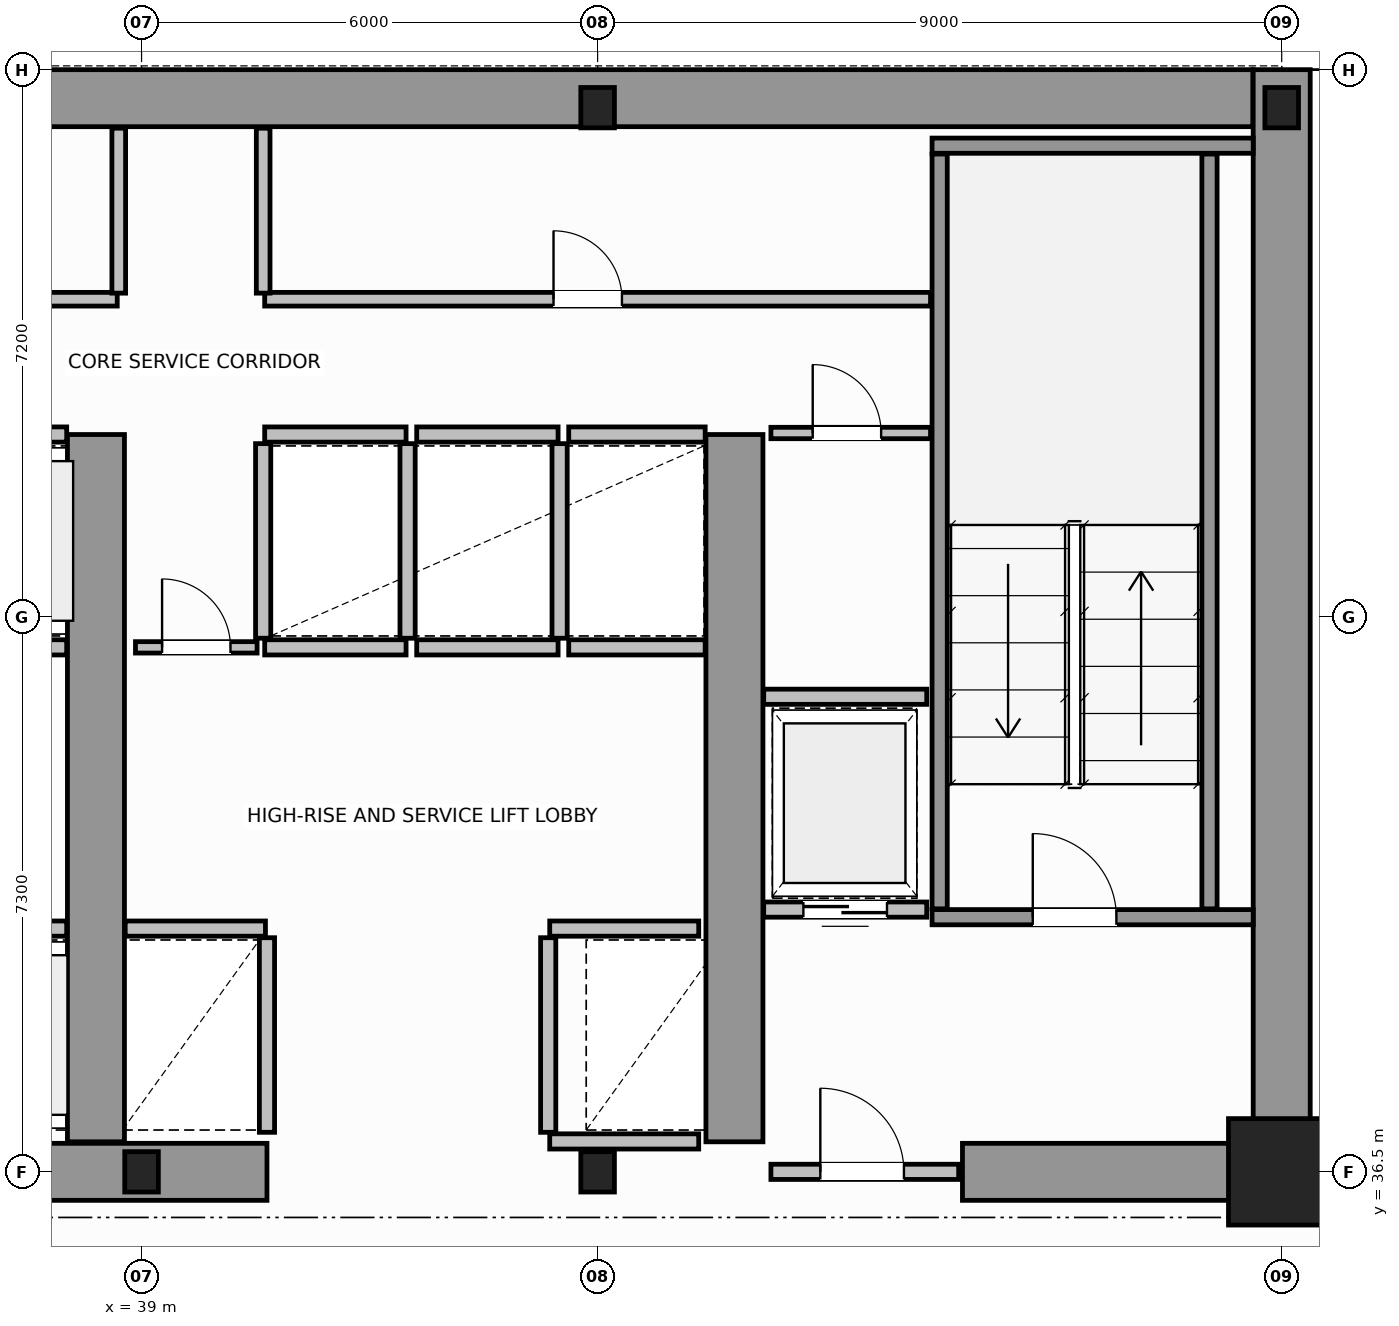
"""IFC4 building model, lengths in metres.
Left out: names, types, materials, properties, quantities, classifications, styles, units other than length and angle.
Written with IfcOpenShell. Run it as: python <this file> out.ifc"""

import sys

from ifc_helpers import new_model, si_unit, direction, frame, frame_2d, origin, origin_2d, place, context, subcontext, project, spatial, rectangle, i_section, extrude, source, transform, mapped, element, fill, save


model = new_model("IFC4")
c1 = context("Model", 3, precision=1e-05, world=origin(), true_north=direction((0.0, 1.0)))
c2 = subcontext(c1, "Body", "Model", "MODEL_VIEW")
j1 = project(units=[si_unit("LENGTHUNIT", "METRE"), si_unit("PLANEANGLEUNIT", "RADIAN")], contexts=[c1])
p1 = place(None, origin())
s1 = spatial("IfcSite", under=j1, at=p1, CompositionType="ELEMENT")
p2 = place(p1, origin())
s2 = spatial("IfcBuilding", under=s1, at=p2, CompositionType="ELEMENT")
p3 = place(p2, frame((0.0, 0.0, 103.4)))
s3 = spatial("IfcBuildingStorey", under=s2, at=p3, CompositionType="ELEMENT", Elevation=103.4)
m1 = source(origin(), c2, "Body", "SweptSolid", [
    extrude(i_section(OverallWidth=0.442, OverallDepth=0.531, WebThickness=0.065, FlangeThickness=0.076, FilletRadius=0.015, at=origin_2d()), origin(), (0.0, 0.0, 1.0), 3.8),
])
for number, where, z_axis, x_axis in (
    (1, (39.0, 36.5, 0.0), (0.0, 0.0, 1.0), (1.0, 0.0, 0.0)),
    (2, (45.0, 36.5, 0.0), (0.0, 0.0, 1.0), (1.0, 0.0, 0.0)),
):
    element("IfcColumn", number, at=place(p3, frame(where, z_axis=z_axis, x_axis=x_axis)), inside=s3, PredefinedType="COLUMN", context=c2, shape_type="MappedRepresentation", body=[
        mapped(m1, transform((0.0, 0.0, 0.0), scale=1.0)),
    ])
m2 = source(origin(), c2, "Body", "SweptSolid", [
    extrude(rectangle(XDim=1.4, YDim=1.4, at=origin_2d()), origin(), (0.0, 0.0, 1.0), 3.8),
])
p4 = place(p3, frame((54.0, 36.5, 0.0), z_axis=(0.0, 0.0, 1.0), x_axis=(1.0, 0.0, 0.0)))
e3 = element("IfcColumn", 3, at=p4, inside=s3, PredefinedType="COLUMN", context=c2, shape_type="MappedRepresentation", body=[
    mapped(m2, transform((0.0, 0.0, 0.0), scale=1.0)),
])
for number, where, z_axis, x_axis in (
    (4, (45.0, 50.5, 0.0), (0.0, 0.0, 1.0), (1.0, 0.0, 0.0)),
    (5, (54.0, 50.5, 0.0), (0.0, 0.0, 1.0), (1.0, 0.0, 0.0)),
):
    element("IfcColumn", number, at=place(p3, frame(where, z_axis=z_axis, x_axis=x_axis)), inside=s3, PredefinedType="COLUMN", context=c2, shape_type="MappedRepresentation", body=[
        mapped(m1, transform((0.0, 0.0, 0.0), scale=1.0)),
    ])
p5 = place(p3, frame((34.002, 50.625, 0.0), z_axis=(0.0, 0.0, 1.0), x_axis=(1.0, 0.0, 0.0)))
e6 = element("IfcWall", 6, at=p5, inside=s3, PredefinedType="SHEAR", context=c2, shape_type="SweptSolid", body=[
    extrude(rectangle(XDim=19.619, YDim=0.75, at=frame_2d((9.81, 0.0))), origin(), (0.0, 0.0, 1.0), 3.8),
])
p6 = place(p3, frame((54.0, 36.5, 0.0), z_axis=(0.0, 0.0, 1.0), x_axis=(0.0, 1.0, 0.0)))
e7 = element("IfcWall", 7, at=p6, inside=s3, PredefinedType="SHEAR", context=c2, shape_type="SweptSolid", body=[
    extrude(rectangle(XDim=14.5, YDim=0.75, at=frame_2d((7.25, 0.0))), origin(), (0.0, 0.0, 1.0), 3.8),
])
p7 = place(p3, frame((36.15, 36.5, 0.0), z_axis=(0.0, 0.0, 1.0), x_axis=(1.0, 0.0, 0.0)))
e8 = element("IfcWall", 8, at=p7, inside=s3, PredefinedType="SHEAR", context=c2, shape_type="SweptSolid", body=[
    extrude(rectangle(XDim=4.5, YDim=0.75, at=frame_2d((2.25, 0.0))), origin(), (0.0, 0.0, 1.0), 3.8),
])
p8 = place(p3, frame((49.8, 36.5, 0.0), z_axis=(0.0, 0.0, 1.0), x_axis=(1.0, 0.0, 0.0)))
e9 = element("IfcWall", 9, at=p8, inside=s3, PredefinedType="SHEAR", context=c2, shape_type="SweptSolid", body=[
    extrude(rectangle(XDim=3.805, YDim=0.75, at=frame_2d((1.902, 0.0))), origin(), (0.0, 0.0, 1.0), 2.38),
])
for number, where, z_axis, x_axis in (
    (10, (38.4, 36.895, 0.0), (0.0, 0.0, 1.0), (0.0, 1.0, 0.0)),
    (11, (46.8, 36.895, 0.0), (0.0, 0.0, 1.0), (0.0, 1.0, 0.0)),
):
    element("IfcWall", number, at=place(p3, frame(where, z_axis=z_axis, x_axis=x_axis)), inside=s3, PredefinedType="SHEAR", context=c2, shape_type="SweptSolid", body=[
        extrude(rectangle(XDim=9.305, YDim=0.75, at=frame_2d((4.652, 0.0))), origin(), (0.0, 0.0, 1.0), 3.8),
    ])
p9 = place(p3, frame((49.4, 39.85, 0.0), z_axis=(0.0, 0.0, 1.0), x_axis=(1.0, 0.0, 0.0)))
e12 = element("IfcWall", 12, at=p9, inside=s3, PredefinedType="SOLIDWALL", context=c2, shape_type="SweptSolid", body=[
    extrude(rectangle(XDim=4.225, YDim=0.2, at=frame_2d((2.113, 0.0))), origin(), (0.0, 0.0, 1.0), 3.8),
])
p10 = place(p9, frame((1.325, 0.0, 0.0)))
e13 = element("IfcOpeningElement", 13, at=p10, cuts=e12, PredefinedType="OPENING", context=c2, shape_type="SweptSolid", body=[
    extrude(rectangle(XDim=1.1, YDim=2.15, at=frame_2d((0.55, 1.075))), frame((0.0, 0.11, 0.0), z_axis=(0.0, -1.0, 0.0), x_axis=(1.0, 0.0, 0.0)), (0.0, 0.0, 1.0), 0.22),
])
p11 = place(p3, frame((49.4, 50.0, 0.0), z_axis=(0.0, 0.0, 1.0), x_axis=(1.0, 0.0, 0.0)))
e14 = element("IfcWall", 14, at=p11, inside=s3, PredefinedType="SOLIDWALL", context=c2, shape_type="SweptSolid", body=[
    extrude(rectangle(XDim=4.225, YDim=0.2, at=frame_2d((2.113, 0.0))), origin(), (0.0, 0.0, 1.0), 3.8),
])
for number, where, z_axis, x_axis in (
    (15, (49.5, 39.96, 0.0), (0.0, 0.0, 1.0), (0.0, 1.0, 0.0)),
    (16, (53.05, 39.96, 0.0), (0.0, 0.0, 1.0), (0.0, 1.0, 0.0)),
):
    element("IfcWall", number, at=place(p3, frame(where, z_axis=z_axis, x_axis=x_axis)), inside=s3, PredefinedType="SOLIDWALL", context=c2, shape_type="SweptSolid", body=[
        extrude(rectangle(XDim=9.93, YDim=0.2, at=frame_2d((4.965, 0.0))), origin(), (0.0, 0.0, 1.0), 3.8),
    ])
p12 = place(p3, frame((47.28, 36.5, 0.0), z_axis=(0.0, 0.0, 1.0), x_axis=(1.0, 0.0, 0.0)))
e17 = element("IfcWall", 17, at=p12, inside=s3, PredefinedType="SOLIDWALL", context=c2, shape_type="SweptSolid", body=[
    extrude(rectangle(XDim=2.47, YDim=0.2, at=frame_2d((1.235, 0.0))), origin(), (0.0, 0.0, 1.0), 2.37),
])
p13 = place(p12, frame((0.65, 0.0, 0.0)))
e18 = element("IfcOpeningElement", 18, at=p13, cuts=e17, PredefinedType="OPENING", context=c2, shape_type="SweptSolid", body=[
    extrude(rectangle(XDim=1.1, YDim=2.15, at=frame_2d((0.55, 1.075))), frame((0.0, 0.11, 0.0), z_axis=(0.0, -1.0, 0.0), x_axis=(1.0, 0.0, 0.0)), (0.0, 0.0, 1.0), 0.22),
])
p14 = place(p3, frame((36.17, 39.7, 0.0), z_axis=(0.0, 0.0, 1.0), x_axis=(1.0, 0.0, 0.0)))
e19 = element("IfcWall", 19, at=p14, inside=s3, PredefinedType="SOLIDWALL", context=c2, shape_type="SweptSolid", body=[
    extrude(rectangle(XDim=1.845, YDim=0.2, at=frame_2d((0.922, 0.0))), origin(), (0.0, 0.0, 1.0), 3.58),
])
p15 = place(p14, frame((0.372, 0.0, 0.0)))
e20 = element("IfcOpeningElement", 20, at=p15, cuts=e19, PredefinedType="OPENING", context=c2, shape_type="SweptSolid", body=[
    extrude(rectangle(XDim=1.1, YDim=2.15, at=frame_2d((0.55, 1.075))), frame((0.0, 0.11, 0.0), z_axis=(0.0, -1.0, 0.0), x_axis=(1.0, 0.0, 0.0)), (0.0, 0.0, 1.0), 0.22),
])
p16 = place(p3, frame((36.29, 43.4, 0.0), z_axis=(0.0, 0.0, 1.0), x_axis=(1.0, 0.0, 0.0)))
e21 = element("IfcWall", 21, at=p16, inside=s3, PredefinedType="SOLIDWALL", context=c2, shape_type="SweptSolid", body=[
    extrude(rectangle(XDim=1.725, YDim=0.2, at=frame_2d((0.862, 0.0))), origin(), (0.0, 0.0, 1.0), 3.58),
])
p17 = place(p16, frame((0.313, 0.0, 0.0)))
e22 = element("IfcOpeningElement", 22, at=p17, cuts=e21, PredefinedType="OPENING", context=c2, shape_type="SweptSolid", body=[
    extrude(rectangle(XDim=1.1, YDim=2.15, at=frame_2d((0.55, 1.075))), frame((0.0, 0.11, 0.0), z_axis=(0.0, -1.0, 0.0), x_axis=(1.0, 0.0, 0.0)), (0.0, 0.0, 1.0), 0.22),
])
p18 = place(p3, frame((36.29, 46.2, 0.0), z_axis=(0.0, 0.0, 1.0), x_axis=(1.0, 0.0, 0.0)))
e23 = element("IfcWall", 23, at=p18, inside=s3, PredefinedType="SOLIDWALL", context=c2, shape_type="SweptSolid", body=[
    extrude(rectangle(XDim=1.725, YDim=0.2, at=frame_2d((0.862, 0.0))), origin(), (0.0, 0.0, 1.0), 3.58),
])
p19 = place(p3, frame((38.785, 39.7, 0.0), z_axis=(0.0, 0.0, 1.0), x_axis=(1.0, 0.0, 0.0)))
e24 = element("IfcWall", 24, at=p19, inside=s3, PredefinedType="SOLIDWALL", context=c2, shape_type="SweptSolid", body=[
    extrude(rectangle(XDim=1.845, YDim=0.2, at=frame_2d((0.922, 0.0))), origin(), (0.0, 0.0, 1.0), 3.58),
])
p20 = place(p3, frame((40.65, 37.02, 0.0), z_axis=(0.0, 0.0, 1.0), x_axis=(0.0, 1.0, 0.0)))
e25 = element("IfcWall", 25, at=p20, inside=s3, PredefinedType="SOLIDWALL", context=c2, shape_type="SweptSolid", body=[
    extrude(rectangle(XDim=2.56, YDim=0.2, at=frame_2d((1.28, 0.0))), origin(), (0.0, 0.0, 1.0), 3.58),
])
p21 = place(p3, frame((44.37, 39.7, 0.0), z_axis=(0.0, 0.0, 1.0), x_axis=(1.0, 0.0, 0.0)))
e26 = element("IfcWall", 26, at=p21, inside=s3, PredefinedType="SOLIDWALL", context=c2, shape_type="SweptSolid", body=[
    extrude(rectangle(XDim=1.96, YDim=0.2, at=frame_2d((0.98, 0.0))), origin(), (0.0, 0.0, 1.0), 3.58),
])
p22 = place(p3, frame((44.37, 36.9, 0.0), z_axis=(0.0, 0.0, 1.0), x_axis=(1.0, 0.0, 0.0)))
e27 = element("IfcWall", 27, at=p22, inside=s3, PredefinedType="SOLIDWALL", context=c2, shape_type="SweptSolid", body=[
    extrude(rectangle(XDim=1.96, YDim=0.2, at=frame_2d((0.98, 0.0))), origin(), (0.0, 0.0, 1.0), 2.37),
])
p23 = place(p3, frame((44.35, 37.02, 0.0), z_axis=(0.0, 0.0, 1.0), x_axis=(0.0, 1.0, 0.0)))
e28 = element("IfcWall", 28, at=p23, inside=s3, PredefinedType="SOLIDWALL", context=c2, shape_type="SweptSolid", body=[
    extrude(rectangle(XDim=2.56, YDim=0.2, at=frame_2d((1.28, 0.0))), origin(), (0.0, 0.0, 1.0), 3.58),
])
for number, where, z_axis, x_axis in (
    (29, (40.62, 43.4, 0.0), (0.0, 0.0, 1.0), (1.0, 0.0, 0.0)),
    (30, (40.62, 46.2, 0.0), (0.0, 0.0, 1.0), (1.0, 0.0, 0.0)),
):
    element("IfcWall", number, at=place(p3, frame(where, z_axis=z_axis, x_axis=x_axis)), inside=s3, PredefinedType="SOLIDWALL", context=c2, shape_type="SweptSolid", body=[
        extrude(rectangle(XDim=1.86, YDim=0.2, at=frame_2d((0.93, 0.0))), origin(), (0.0, 0.0, 1.0), 3.58),
    ])
for number, where, z_axis, x_axis in (
    (31, (40.6, 43.52, 0.0), (0.0, 0.0, 1.0), (0.0, 1.0, 0.0)),
    (32, (42.5, 43.52, 0.0), (0.0, 0.0, 1.0), (0.0, 1.0, 0.0)),
):
    element("IfcWall", number, at=place(p3, frame(where, z_axis=z_axis, x_axis=x_axis)), inside=s3, PredefinedType="SOLIDWALL", context=c2, shape_type="SweptSolid", body=[
        extrude(rectangle(XDim=2.56, YDim=0.2, at=frame_2d((1.28, 0.0))), origin(), (0.0, 0.0, 1.0), 3.58),
    ])
for number, where, z_axis, x_axis in (
    (33, (42.62, 43.4, 0.0), (0.0, 0.0, 1.0), (1.0, 0.0, 0.0)),
    (34, (42.62, 46.2, 0.0), (0.0, 0.0, 1.0), (1.0, 0.0, 0.0)),
):
    element("IfcWall", number, at=place(p3, frame(where, z_axis=z_axis, x_axis=x_axis)), inside=s3, PredefinedType="SOLIDWALL", context=c2, shape_type="SweptSolid", body=[
        extrude(rectangle(XDim=1.86, YDim=0.2, at=frame_2d((0.93, 0.0))), origin(), (0.0, 0.0, 1.0), 3.58),
    ])
p24 = place(p3, frame((44.5, 43.52, 0.0), z_axis=(0.0, 0.0, 1.0), x_axis=(0.0, 1.0, 0.0)))
e35 = element("IfcWall", 35, at=p24, inside=s3, PredefinedType="SOLIDWALL", context=c2, shape_type="SweptSolid", body=[
    extrude(rectangle(XDim=2.56, YDim=0.2, at=frame_2d((1.28, 0.0))), origin(), (0.0, 0.0, 1.0), 3.58),
])
for number, where, z_axis, x_axis in (
    (36, (44.62, 43.4, 0.0), (0.0, 0.0, 1.0), (1.0, 0.0, 0.0)),
    (37, (44.62, 46.2, 0.0), (0.0, 0.0, 1.0), (1.0, 0.0, 0.0)),
):
    element("IfcWall", number, at=place(p3, frame(where, z_axis=z_axis, x_axis=x_axis)), inside=s3, PredefinedType="SOLIDWALL", context=c2, shape_type="SweptSolid", body=[
        extrude(rectangle(XDim=1.795, YDim=0.2, at=frame_2d((0.897, 0.0))), origin(), (0.0, 0.0, 1.0), 3.58),
    ])
p25 = place(p3, frame((47.185, 39.95, 0.0), z_axis=(0.0, 0.0, 1.0), x_axis=(1.0, 0.0, 0.0)))
e38 = element("IfcWall", 38, at=p25, inside=s3, PredefinedType="SOLIDWALL", context=c2, shape_type="SweptSolid", body=[
    extrude(rectangle(XDim=2.145, YDim=0.2, at=frame_2d((1.073, 0.0))), origin(), (0.0, 0.0, 1.0), 3.58),
])
p26 = place(p25, frame((0.522, 0.0, 0.0)))
e39 = element("IfcOpeningElement", 39, at=p26, cuts=e38, PredefinedType="OPENING", context=c2, shape_type="SweptSolid", body=[
    extrude(rectangle(XDim=1.1, YDim=2.15, at=frame_2d((0.55, 1.075))), frame((0.0, 0.11, 0.0), z_axis=(0.0, -1.0, 0.0), x_axis=(1.0, 0.0, 0.0)), (0.0, 0.0, 1.0), 0.22),
])
p27 = place(p3, frame((47.185, 42.75, 0.0), z_axis=(0.0, 0.0, 1.0), x_axis=(1.0, 0.0, 0.0)))
e40 = element("IfcWall", 40, at=p27, inside=s3, PredefinedType="SOLIDWALL", context=c2, shape_type="SweptSolid", body=[
    extrude(rectangle(XDim=2.145, YDim=0.2, at=frame_2d((1.073, 0.0))), origin(), (0.0, 0.0, 1.0), 3.58),
])
p28 = place(p3, frame((47.28, 46.22, 0.0), z_axis=(0.0, 0.0, 1.0), x_axis=(1.0, 0.0, 0.0)))
e41 = element("IfcWall", 41, at=p28, inside=s3, PredefinedType="PARTITIONING", context=c2, shape_type="SweptSolid", body=[
    extrude(rectangle(XDim=2.1, YDim=0.15, at=frame_2d((1.05, 0.0))), origin(), (0.0, 0.0, 1.0), 3.58),
])
p29 = place(p28, frame((0.55, 0.0, 0.0)))
e42 = element("IfcOpeningElement", 42, at=p29, cuts=e41, PredefinedType="OPENING", context=c2, shape_type="SweptSolid", body=[
    extrude(rectangle(XDim=0.9, YDim=2.1, at=frame_2d((0.45, 1.05))), frame((0.0, 0.085, 0.0), z_axis=(0.0, -1.0, 0.0), x_axis=(1.0, 0.0, 0.0)), (0.0, 0.0, 1.0), 0.17),
])
p30 = place(p3, frame((38.92, 43.4, 0.0), z_axis=(0.0, 0.0, 1.0), x_axis=(1.0, 0.0, 0.0)))
e43 = element("IfcWall", 43, at=p30, inside=s3, PredefinedType="PARTITIONING", context=c2, shape_type="SweptSolid", body=[
    extrude(rectangle(XDim=1.6, YDim=0.15, at=frame_2d((0.8, 0.0))), origin(), (0.0, 0.0, 1.0), 3.58),
])
p31 = place(p30, frame((0.35, 0.0, 0.0)))
e44 = element("IfcOpeningElement", 44, at=p31, cuts=e43, PredefinedType="OPENING", context=c2, shape_type="SweptSolid", body=[
    extrude(rectangle(XDim=0.9, YDim=2.1, at=frame_2d((0.45, 1.05))), frame((0.0, 0.085, 0.0), z_axis=(0.0, -1.0, 0.0), x_axis=(1.0, 0.0, 0.0)), (0.0, 0.0, 1.0), 0.17),
])
p32 = place(p3, frame((18.62, 47.98, 0.0), z_axis=(0.0, 0.0, 1.0), x_axis=(1.0, 0.0, 0.0)))
e45 = element("IfcWall", 45, at=p32, inside=s3, PredefinedType="PLUMBINGWALL", context=c2, shape_type="SweptSolid", body=[
    extrude(rectangle(XDim=20.06, YDim=0.18, at=frame_2d((10.03, 0.0))), origin(), (0.0, 0.0, 1.0), 3.58),
])
p33 = place(p32, frame((3.5, 0.0, 0.0)))
e46 = element("IfcOpeningElement", 46, at=p33, cuts=e45, PredefinedType="OPENING", context=c2, shape_type="SweptSolid", body=[
    extrude(rectangle(XDim=0.9, YDim=2.15, at=frame_2d((0.45, 1.075))), frame((0.0, 0.1, 0.0), z_axis=(0.0, -1.0, 0.0), x_axis=(1.0, 0.0, 0.0)), (0.0, 0.0, 1.0), 0.2),
])
p34 = place(p32, frame((10.8, 0.0, 0.0)))
e47 = element("IfcOpeningElement", 47, at=p34, cuts=e45, PredefinedType="OPENING", context=c2, shape_type="SweptSolid", body=[
    extrude(rectangle(XDim=0.9, YDim=2.15, at=frame_2d((0.45, 1.075))), frame((0.0, 0.1, 0.0), z_axis=(0.0, -1.0, 0.0), x_axis=(1.0, 0.0, 0.0)), (0.0, 0.0, 1.0), 0.2),
])
p35 = place(p32, frame((16.8, 0.0, 0.0)))
e48 = element("IfcOpeningElement", 48, at=p35, cuts=e45, PredefinedType="OPENING", context=c2, shape_type="SweptSolid", body=[
    extrude(rectangle(XDim=0.9, YDim=2.15, at=frame_2d((0.45, 1.075))), frame((0.0, 0.1, 0.0), z_axis=(0.0, -1.0, 0.0), x_axis=(1.0, 0.0, 0.0)), (0.0, 0.0, 1.0), 0.2),
])
p36 = place(p3, frame((40.62, 47.98, 0.0), z_axis=(0.0, 0.0, 1.0), x_axis=(1.0, 0.0, 0.0)))
e49 = element("IfcWall", 49, at=p36, inside=s3, PredefinedType="PLUMBINGWALL", context=c2, shape_type="SweptSolid", body=[
    extrude(rectangle(XDim=8.76, YDim=0.18, at=frame_2d((4.38, 0.0))), origin(), (0.0, 0.0, 1.0), 3.58),
])
p37 = place(p36, frame((3.8, 0.0, 0.0)))
e50 = element("IfcOpeningElement", 50, at=p37, cuts=e49, PredefinedType="OPENING", context=c2, shape_type="SweptSolid", body=[
    extrude(rectangle(XDim=0.9, YDim=2.15, at=frame_2d((0.45, 1.075))), frame((0.0, 0.1, 0.0), z_axis=(0.0, -1.0, 0.0), x_axis=(1.0, 0.0, 0.0)), (0.0, 0.0, 1.0), 0.2),
])
for number, where, z_axis, x_axis in (
    (51, (38.7, 48.06, 0.0), (0.0, 0.0, 1.0), (0.0, 1.0, 0.0)),
    (52, (40.6, 48.06, 0.0), (0.0, 0.0, 1.0), (0.0, 1.0, 0.0)),
):
    element("IfcWall", number, at=place(p3, frame(where, z_axis=z_axis, x_axis=x_axis)), inside=s3, PredefinedType="PLUMBINGWALL", context=c2, shape_type="SweptSolid", body=[
        extrude(rectangle(XDim=2.17, YDim=0.18, at=frame_2d((1.085, 0.0))), origin(), (0.0, 0.0, 1.0), 3.58),
    ])
p38 = place(p3, frame((54.06, 36.48, 0.0), z_axis=(0.0, 0.0, 1.0), x_axis=(1.0, 0.0, 0.0)))
e53 = element("IfcWall", 53, at=p38, inside=s3, PredefinedType="PARTITIONING", context=c2, shape_type="SweptSolid", body=[
    extrude(rectangle(XDim=6.666, YDim=0.12, at=frame_2d((3.333, 0.0))), origin(), (0.0, 0.0, 1.0), 2.87),
])
p39 = place(p38, frame((2.883, 0.0, 0.0)))
e54 = element("IfcOpeningElement", 54, at=p39, cuts=e53, PredefinedType="OPENING", context=c2, shape_type="SweptSolid", body=[
    extrude(rectangle(XDim=0.9, YDim=2.15, at=frame_2d((0.45, 1.075))), frame((0.0, 0.07, 0.0), z_axis=(0.0, -1.0, 0.0), x_axis=(1.0, 0.0, 0.0)), (0.0, 0.0, 1.0), 0.14),
])
m3 = source(origin(), c2, "Body", "SweptSolid", [
    extrude(rectangle(XDim=1.1, YDim=2.15, at=frame_2d((0.55, 1.075))), frame((0.0, 0.025, 0.0), z_axis=(0.0, -1.0, 0.0), x_axis=(1.0, 0.0, 0.0)), (0.0, 0.0, 1.0), 0.05),
])
p40 = place(p10, origin())
e55 = element("IfcDoor", 55, at=p40, inside=s3, OperationType="SINGLE_SWING_RIGHT", PredefinedType="DOOR", context=c2, shape_type="MappedRepresentation", body=[
    mapped(m3, transform((0.0, 0.0, 0.0), scale=1.0)),
])
fill(e13, e55)
p41 = place(p13, origin())
e56 = element("IfcDoor", 56, at=p41, inside=s3, OperationType="SINGLE_SWING_LEFT", PredefinedType="DOOR", context=c2, shape_type="MappedRepresentation", body=[
    mapped(m3, transform((0.0, 0.0, 0.0), scale=1.0)),
])
fill(e18, e56)
p42 = place(p26, origin())
e57 = element("IfcDoor", 57, at=p42, inside=s3, OperationType="DOUBLE_DOOR_SLIDING", PredefinedType="DOOR", context=c2, shape_type="MappedRepresentation", body=[
    mapped(m3, transform((0.0, 0.0, 0.0), scale=1.0)),
])
fill(e39, e57)
m4 = source(origin(), c2, "Body", "SweptSolid", [
    extrude(rectangle(XDim=0.9, YDim=2.1, at=frame_2d((0.45, 1.05))), frame((0.0, 0.025, 0.0), z_axis=(0.0, -1.0, 0.0), x_axis=(1.0, 0.0, 0.0)), (0.0, 0.0, 1.0), 0.05),
])
p43 = place(p29, origin())
e58 = element("IfcDoor", 58, at=p43, inside=s3, OperationType="SINGLE_SWING_RIGHT", PredefinedType="DOOR", context=c2, shape_type="MappedRepresentation", body=[
    mapped(m4, transform((0.0, 0.0, 0.0), scale=1.0)),
])
fill(e42, e58)
p44 = place(p31, origin())
e59 = element("IfcDoor", 59, at=p44, inside=s3, OperationType="SINGLE_SWING_LEFT", PredefinedType="DOOR", context=c2, shape_type="MappedRepresentation", body=[
    mapped(m4, transform((0.0, 0.0, 0.0), scale=1.0)),
])
fill(e44, e59)
m5 = source(origin(), c2, "Body", "SweptSolid", [
    extrude(rectangle(XDim=0.9, YDim=2.15, at=frame_2d((0.45, 1.075))), frame((0.0, 0.025, 0.0), z_axis=(0.0, -1.0, 0.0), x_axis=(1.0, 0.0, 0.0)), (0.0, 0.0, 1.0), 0.05),
])
p45 = place(p37, origin())
e60 = element("IfcDoor", 60, at=p45, inside=s3, OperationType="SINGLE_SWING_RIGHT", PredefinedType="DOOR", context=c2, shape_type="MappedRepresentation", body=[
    mapped(m5, transform((0.0, 0.0, 0.0), scale=1.0)),
])
fill(e50, e60)
save(model, sys.argv[1])
